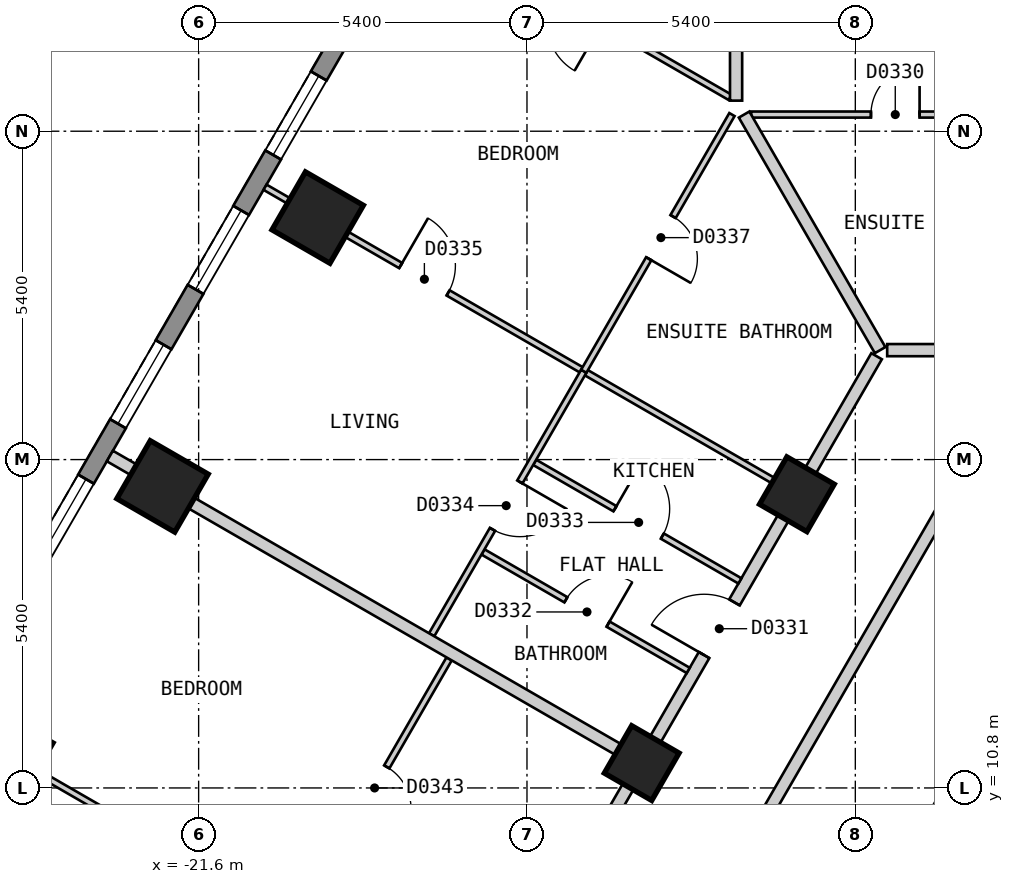
"""IFC4 building model, lengths in metres.
Left out: names, types, materials, properties, quantities, classifications, styles, units other than length and angle.
Written with IfcOpenShell. Run it as: python <this file> out.ifc"""

import sys

from ifc_helpers import new_model, si_unit, direction, frame, frame_2d, origin, origin_2d, place, context, subcontext, project, spatial, polyline, rectangle, outline, extrude, element, fill, save


model = new_model("IFC4")
c1 = context("Model", 3, precision=1e-05, world=origin(), true_north=direction((0.0, 1.0)))
c2 = subcontext(c1, "Body", "Model", "MODEL_VIEW")
j1 = project(units=[si_unit("LENGTHUNIT", "METRE"), si_unit("PLANEANGLEUNIT", "RADIAN")], contexts=[c1])
p1 = place(None, origin())
s1 = spatial("IfcSite", under=j1, at=p1, CompositionType="ELEMENT")
p2 = place(p1, origin())
s2 = spatial("IfcBuilding", under=s1, at=p2, CompositionType="ELEMENT")
p3 = place(p2, frame((0.0, 0.0, 59.4)))
s3 = spatial("IfcBuildingStorey", under=s2, at=p3, CompositionType="ELEMENT", Elevation=59.4)
for number, where, z_axis, x_axis in (
    (1, (-19.642, 20.18, 0.0), (0.0, 0.0, 1.0), (-0.5, -0.866, 0.0)),
    (2, (-22.194, 15.759, 0.0), (0.0, 0.0, 1.0), (-0.5, -0.866, 0.0)),
    (3, (-24.746, 11.339, 0.0), (0.0, 0.0, 1.0), (-0.5, -0.866, 0.0)),
):
    element("IfcColumn", number, at=place(p3, frame(where, z_axis=z_axis, x_axis=x_axis)), inside=s3, PredefinedType="COLUMN", context=c2, shape_type="SweptSolid", body=[
        extrude(rectangle(XDim=1.1, YDim=1.1, at=origin_2d()), origin(), (0.0, 0.0, 1.0), 3.0),
    ])
for number, where, z_axis, x_axis in (
    (4, (-11.761, 15.63, 0.0), (0.0, 0.0, 1.0), (-0.5, -0.866, 0.0)),
    (5, (-14.313, 11.209, 0.0), (0.0, 0.0, 1.0), (-0.5, -0.866, 0.0)),
):
    element("IfcColumn", number, at=place(p3, frame(where, z_axis=z_axis, x_axis=x_axis)), inside=s3, PredefinedType="COLUMN", context=c2, shape_type="SweptSolid", body=[
        extrude(rectangle(XDim=0.9, YDim=0.9, at=origin_2d()), origin(), (0.0, 0.0, 1.0), 3.0),
    ])
p4 = place(p3, frame((-17.71, 25.825, 0.0), z_axis=(0.0, 0.0, 1.0), x_axis=(-0.500001938803, -0.866024284413, 0.0)))
e6 = element("IfcWall", 6, at=p4, inside=s3, PredefinedType="SOLIDWALL", context=c2, shape_type="SweptSolid", body=[
    extrude(outline(polyline([(0.0, -0.15), (27.02, -0.15), (26.94, 0.15), (0.08, 0.15), (0.0, -0.15)])), origin(), (0.0, 0.0, 1.0), 2.6),
])
p5 = place(p4, frame((1.277, 0.0, 0.15)))
e7 = element("IfcOpeningElement", 7, at=p5, cuts=e6, PredefinedType="OPENING", context=c2, shape_type="SweptSolid", body=[
    extrude(rectangle(XDim=1.5, YDim=2.1, at=frame_2d((0.75, 1.05))), frame((0.0, 0.16, 0.0), z_axis=(0.0, -1.0, 0.0), x_axis=(1.0, 0.0, 0.0)), (0.0, 0.0, 1.0), 0.32),
])
p6 = place(p4, frame((3.829, 0.0, 0.15)))
e8 = element("IfcOpeningElement", 8, at=p6, cuts=e6, PredefinedType="OPENING", context=c2, shape_type="SweptSolid", body=[
    extrude(rectangle(XDim=1.5, YDim=2.1, at=frame_2d((0.75, 1.05))), frame((0.0, 0.16, 0.0), z_axis=(0.0, -1.0, 0.0), x_axis=(1.0, 0.0, 0.0)), (0.0, 0.0, 1.0), 0.32),
])
p7 = place(p4, frame((6.382, 0.0, 0.15)))
e9 = element("IfcOpeningElement", 9, at=p7, cuts=e6, PredefinedType="OPENING", context=c2, shape_type="SweptSolid", body=[
    extrude(rectangle(XDim=1.5, YDim=2.1, at=frame_2d((0.75, 1.05))), frame((0.0, 0.16, 0.0), z_axis=(0.0, -1.0, 0.0), x_axis=(1.0, 0.0, 0.0)), (0.0, 0.0, 1.0), 0.32),
])
p8 = place(p4, frame((8.933, 0.0, 0.15)))
e10 = element("IfcOpeningElement", 10, at=p8, cuts=e6, PredefinedType="OPENING", context=c2, shape_type="SweptSolid", body=[
    extrude(rectangle(XDim=1.5, YDim=2.1, at=frame_2d((0.75, 1.05))), frame((0.0, 0.16, 0.0), z_axis=(0.0, -1.0, 0.0), x_axis=(1.0, 0.0, 0.0)), (0.0, 0.0, 1.0), 0.32),
])
p9 = place(p4, frame((11.485, 0.0, 0.15)))
e11 = element("IfcOpeningElement", 11, at=p9, cuts=e6, PredefinedType="OPENING", context=c2, shape_type="SweptSolid", body=[
    extrude(rectangle(XDim=1.5, YDim=2.1, at=frame_2d((0.75, 1.05))), frame((0.0, 0.16, 0.0), z_axis=(0.0, -1.0, 0.0), x_axis=(1.0, 0.0, 0.0)), (0.0, 0.0, 1.0), 0.32),
])
p10 = place(p4, frame((14.037, 0.0, 0.15)))
e12 = element("IfcOpeningElement", 12, at=p10, cuts=e6, PredefinedType="OPENING", context=c2, shape_type="SweptSolid", body=[
    extrude(rectangle(XDim=1.5, YDim=2.1, at=frame_2d((0.75, 1.05))), frame((0.0, 0.16, 0.0), z_axis=(0.0, -1.0, 0.0), x_axis=(1.0, 0.0, 0.0)), (0.0, 0.0, 1.0), 0.32),
])
p11 = place(p4, frame((16.589, 0.0, 0.15)))
e13 = element("IfcOpeningElement", 13, at=p11, cuts=e6, PredefinedType="OPENING", context=c2, shape_type="SweptSolid", body=[
    extrude(rectangle(XDim=1.5, YDim=2.1, at=frame_2d((0.75, 1.05))), frame((0.0, 0.16, 0.0), z_axis=(0.0, -1.0, 0.0), x_axis=(1.0, 0.0, 0.0)), (0.0, 0.0, 1.0), 0.32),
])
p12 = place(p4, frame((19.141, 0.0, 0.15)))
e14 = element("IfcOpeningElement", 14, at=p12, cuts=e6, PredefinedType="OPENING", context=c2, shape_type="SweptSolid", body=[
    extrude(rectangle(XDim=1.5, YDim=2.1, at=frame_2d((0.75, 1.05))), frame((0.0, 0.16, 0.0), z_axis=(0.0, -1.0, 0.0), x_axis=(1.0, 0.0, 0.0)), (0.0, 0.0, 1.0), 0.32),
])
p13 = place(p4, frame((21.693, 0.0, 0.15)))
e15 = element("IfcOpeningElement", 15, at=p13, cuts=e6, PredefinedType="OPENING", context=c2, shape_type="SweptSolid", body=[
    extrude(rectangle(XDim=1.5, YDim=2.1, at=frame_2d((0.75, 1.05))), frame((0.0, 0.16, 0.0), z_axis=(0.0, -1.0, 0.0), x_axis=(1.0, 0.0, 0.0)), (0.0, 0.0, 1.0), 0.32),
])
p14 = place(p4, frame((24.244, 0.0, 0.15)))
e16 = element("IfcOpeningElement", 16, at=p14, cuts=e6, PredefinedType="OPENING", context=c2, shape_type="SweptSolid", body=[
    extrude(rectangle(XDim=1.5, YDim=2.1, at=frame_2d((0.75, 1.05))), frame((0.0, 0.16, 0.0), z_axis=(0.0, -1.0, 0.0), x_axis=(1.0, 0.0, 0.0)), (0.0, 0.0, 1.0), 0.32),
])
p15 = place(p3, frame((-10.276, 18.0, 0.0), z_axis=(0.0, 0.0, 1.0), x_axis=(1.0, 0.0, 0.0)))
e17 = element("IfcWall", 17, at=p15, inside=s3, PredefinedType="PARTITIONING", context=c2, shape_type="SweptSolid", body=[
    extrude(rectangle(XDim=20.5, YDim=0.2, at=frame_2d((10.25, 0.0))), origin(), (0.0, 0.0, 1.0), 2.6),
])
p16 = place(p15, frame((19.264, 0.0, 0.0)))
e18 = element("IfcOpeningElement", 18, at=p16, cuts=e17, PredefinedType="OPENING", context=c2, shape_type="SweptSolid", body=[
    extrude(rectangle(XDim=1.0, YDim=2.1, at=frame_2d((0.5, 1.05))), frame((0.0, 0.11, 0.0), z_axis=(0.0, -1.0, 0.0), x_axis=(1.0, 0.0, 0.0)), (0.0, 0.0, 1.0), 0.22),
])
p17 = place(p15, frame((14.879, 0.0, 0.0)))
e19 = element("IfcOpeningElement", 19, at=p17, cuts=e17, PredefinedType="OPENING", context=c2, shape_type="SweptSolid", body=[
    extrude(rectangle(XDim=1.0, YDim=2.1, at=frame_2d((0.5, 1.05))), frame((0.0, 0.11, 0.0), z_axis=(0.0, -1.0, 0.0), x_axis=(1.0, 0.0, 0.0)), (0.0, 0.0, 1.0), 0.22),
])
p18 = place(p15, frame((4.671, 0.0, 0.0)))
e20 = element("IfcOpeningElement", 20, at=p18, cuts=e17, PredefinedType="OPENING", context=c2, shape_type="SweptSolid", body=[
    extrude(rectangle(XDim=1.0, YDim=2.1, at=frame_2d((0.5, 1.05))), frame((0.0, 0.11, 0.0), z_axis=(0.0, -1.0, 0.0), x_axis=(1.0, 0.0, 0.0)), (0.0, 0.0, 1.0), 0.22),
])
p19 = place(p3, frame((-10.854, 8.0, 0.0), z_axis=(0.0, 0.0, 1.0), x_axis=(0.499964141897, 0.86604610548, 0.0)))
e21 = element("IfcWall", 21, at=p19, inside=s3, PredefinedType="PARTITIONING", context=c2, shape_type="SweptSolid", body=[
    extrude(rectangle(XDim=9.007, YDim=0.2, at=frame_2d((4.503, 0.0))), origin(), (0.0, 0.0, 1.0), 2.6),
])
p20 = place(p3, frame((-18.244, -0.001, 0.0), z_axis=(0.0, 0.0, 1.0), x_axis=(0.499962999376, 0.866046765051, 0.0)))
e22 = element("IfcWall", 22, at=p20, inside=s3, PredefinedType="PARTITIONING", context=c2, shape_type="SweptSolid", body=[
    extrude(rectangle(XDim=18.245, YDim=0.2, at=frame_2d((9.123, 0.0))), origin(), (0.0, 0.0, 1.0), 2.6),
])
p21 = place(p20, frame((8.672, 0.0, 0.0)))
e23 = element("IfcOpeningElement", 23, at=p21, cuts=e22, PredefinedType="OPENING", context=c2, shape_type="SweptSolid", body=[
    extrude(rectangle(XDim=0.9, YDim=2.1, at=frame_2d((0.45, 1.05))), frame((0.0, 0.11, 0.0), z_axis=(0.0, -1.0, 0.0), x_axis=(1.0, 0.0, 0.0)), (0.0, 0.0, 1.0), 0.22),
])
p22 = place(p3, frame((-20.727, 0.099, 0.0), z_axis=(0.0, 0.0, 1.0), x_axis=(0.499993204491, 0.866029327138, 0.0)))
e24 = element("IfcWall", 24, at=p22, inside=s3, PredefinedType="PARTITIONING", context=c2, shape_type="SweptSolid", body=[
    extrude(rectangle(XDim=20.554, YDim=0.2, at=frame_2d((10.277, 0.0))), origin(), (0.0, 0.0, 1.0), 2.6),
])
p23 = place(p22, frame((14.88, 0.0, 0.0)))
e25 = element("IfcOpeningElement", 25, at=p23, cuts=e24, PredefinedType="OPENING", context=c2, shape_type="SweptSolid", body=[
    extrude(rectangle(XDim=1.0, YDim=2.1, at=frame_2d((0.5, 1.05))), frame((0.0, 0.11, 0.0), z_axis=(0.0, -1.0, 0.0), x_axis=(1.0, 0.0, 0.0)), (0.0, 0.0, 1.0), 0.22),
])
p24 = place(p22, frame((4.673, 0.0, 0.0)))
e26 = element("IfcOpeningElement", 26, at=p24, cuts=e24, PredefinedType="OPENING", context=c2, shape_type="SweptSolid", body=[
    extrude(rectangle(XDim=1.0, YDim=2.1, at=frame_2d((0.5, 1.05))), frame((0.0, 0.11, 0.0), z_axis=(0.0, -1.0, 0.0), x_axis=(1.0, 0.0, 0.0)), (0.0, 0.0, 1.0), 0.22),
])
p25 = place(p22, frame((0.838, 0.0, 0.0)))
e27 = element("IfcOpeningElement", 27, at=p25, cuts=e24, PredefinedType="OPENING", context=c2, shape_type="SweptSolid", body=[
    extrude(rectangle(XDim=0.8, YDim=2.1, at=frame_2d((0.4, 1.05))), frame((0.0, 0.11, 0.0), z_axis=(0.0, -1.0, 0.0), x_axis=(1.0, 0.0, 0.0)), (0.0, 0.0, 1.0), 0.22),
])
p26 = place(p3, frame((-25.611, 11.839, 0.0), z_axis=(0.0, 0.0, 1.0), x_axis=(0.866022959057, -0.500004234368, 0.0)))
e28 = element("IfcWall", 28, at=p26, inside=s3, PredefinedType="PARTITIONING", context=c2, shape_type="SweptSolid", body=[
    extrude(rectangle(XDim=10.0, YDim=0.1, at=frame_2d((5.0, 0.0))), origin(), (0.0, 0.0, 1.0), 2.6),
])
p27 = place(p26, frame((4.305, 0.0, 0.0)))
e29 = element("IfcOpeningElement", 29, at=p27, cuts=e28, PredefinedType="OPENING", context=c2, shape_type="SweptSolid", body=[
    extrude(rectangle(XDim=0.9, YDim=2.1, at=frame_2d((0.45, 1.05))), frame((0.0, 0.06, 0.0), z_axis=(0.0, -1.0, 0.0), x_axis=(1.0, 0.0, 0.0)), (0.0, 0.0, 1.0), 0.12),
])
p28 = place(p3, frame((-16.923, 14.681, 0.0), z_axis=(0.0, 0.0, 1.0), x_axis=(0.866087525071, -0.499892387336, 0.0)))
e30 = element("IfcWall", 30, at=p28, inside=s3, PredefinedType="PARTITIONING", context=c2, shape_type="SweptSolid", body=[
    extrude(rectangle(XDim=3.897, YDim=0.1, at=frame_2d((1.948, 0.0))), origin(), (0.0, 0.0, 1.0), 2.6),
])
p29 = place(p28, frame((1.574, 0.0, 0.0)))
e31 = element("IfcOpeningElement", 31, at=p29, cuts=e30, PredefinedType="OPENING", context=c2, shape_type="SweptSolid", body=[
    extrude(rectangle(XDim=0.8, YDim=2.1, at=frame_2d((0.4, 1.05))), frame((0.0, 0.06, 0.0), z_axis=(0.0, -1.0, 0.0), x_axis=(1.0, 0.0, 0.0)), (0.0, 0.0, 1.0), 0.12),
])
p30 = place(p3, frame((-16.073, 16.154, 0.0), z_axis=(0.0, 0.0, 1.0), x_axis=(0.865979019114, -0.500080332001, 0.0)))
e32 = element("IfcWall", 32, at=p30, inside=s3, PredefinedType="PARTITIONING", context=c2, shape_type="SweptSolid", body=[
    extrude(rectangle(XDim=3.897, YDim=0.1, at=frame_2d((1.949, 0.0))), origin(), (0.0, 0.0, 1.0), 2.6),
])
p31 = place(p30, frame((1.524, 0.0, 0.0)))
e33 = element("IfcOpeningElement", 33, at=p31, cuts=e32, PredefinedType="OPENING", context=c2, shape_type="SweptSolid", body=[
    extrude(rectangle(XDim=0.9, YDim=2.1, at=frame_2d((0.45, 1.05))), frame((0.0, 0.06, 0.0), z_axis=(0.0, -1.0, 0.0), x_axis=(1.0, 0.0, 0.0)), (0.0, 0.0, 1.0), 0.12),
])
p32 = place(p3, frame((-20.508, 20.679, 0.0), z_axis=(0.0, 0.0, 1.0), x_axis=(0.866047370643, -0.499961950354, 0.0)))
e34 = element("IfcWall", 34, at=p32, inside=s3, PredefinedType="PARTITIONING", context=c2, shape_type="SweptSolid", body=[
    extrude(rectangle(XDim=10.001, YDim=0.1, at=frame_2d((5.0, 0.0))), origin(), (0.0, 0.0, 1.0), 2.6),
])
p33 = place(p32, frame((2.576, 0.0, 0.0)))
e35 = element("IfcOpeningElement", 35, at=p33, cuts=e34, PredefinedType="OPENING", context=c2, shape_type="SweptSolid", body=[
    extrude(rectangle(XDim=0.9, YDim=2.1, at=frame_2d((0.45, 1.05))), frame((0.0, 0.06, 0.0), z_axis=(0.0, -1.0, 0.0), x_axis=(1.0, 0.0, 0.0)), (0.0, 0.0, 1.0), 0.12),
])
p34 = place(p3, frame((-17.955, 25.099, 0.0), z_axis=(0.0, 0.0, 1.0), x_axis=(0.866036353684, -0.499981033738, 0.0)))
e36 = element("IfcWall", 36, at=p34, inside=s3, PredefinedType="PARTITIONING", context=c2, shape_type="SweptSolid", body=[
    extrude(rectangle(XDim=5.885, YDim=0.1, at=frame_2d((2.942, 0.0))), origin(), (0.0, 0.0, 1.0), 2.6),
])
p35 = place(p34, frame((2.55, 0.0, 0.0)))
e37 = element("IfcOpeningElement", 37, at=p35, cuts=e36, PredefinedType="OPENING", context=c2, shape_type="SweptSolid", body=[
    extrude(rectangle(XDim=0.9, YDim=2.1, at=frame_2d((0.45, 1.05))), frame((0.0, 0.06, 0.0), z_axis=(0.0, -1.0, 0.0), x_axis=(1.0, 0.0, 0.0)), (0.0, 0.0, 1.0), 0.12),
])
p36 = place(p3, frame((-12.513, 21.874, 0.0), z_axis=(0.0, 0.0, 1.0), x_axis=(1.0, 0.0, 0.0)))
e38 = element("IfcWall", 38, at=p36, inside=s3, PredefinedType="PARTITIONING", context=c2, shape_type="SweptSolid", body=[
    extrude(rectangle(XDim=4.806, YDim=0.1, at=frame_2d((2.403, 0.0))), origin(), (0.0, 0.0, 1.0), 2.6),
])
p37 = place(p36, frame((1.97, 0.0, 0.0)))
e39 = element("IfcOpeningElement", 39, at=p37, cuts=e38, PredefinedType="OPENING", context=c2, shape_type="SweptSolid", body=[
    extrude(rectangle(XDim=0.8, YDim=2.1, at=frame_2d((0.4, 1.05))), frame((0.0, 0.06, 0.0), z_axis=(0.0, -1.0, 0.0), x_axis=(1.0, 0.0, 0.0)), (0.0, 0.0, 1.0), 0.12),
])
p38 = place(p3, frame((-19.957, 8.633, 0.0), z_axis=(0.0, 0.0, 1.0), x_axis=(0.499967111503, 0.866044391134, 0.0)))
e40 = element("IfcWall", 40, at=p38, inside=s3, PredefinedType="PARTITIONING", context=c2, shape_type="SweptSolid", body=[
    extrude(rectangle(XDim=4.952, YDim=0.1, at=frame_2d((2.476, 0.0))), origin(), (0.0, 0.0, 1.0), 2.6),
])
p39 = place(p38, frame((2.102, 0.0, 0.0)))
e41 = element("IfcOpeningElement", 41, at=p39, cuts=e40, PredefinedType="OPENING", context=c2, shape_type="SweptSolid", body=[
    extrude(rectangle(XDim=0.8, YDim=2.1, at=frame_2d((0.4, 1.05))), frame((0.0, 0.06, 0.0), z_axis=(0.0, -1.0, 0.0), x_axis=(1.0, 0.0, 0.0)), (0.0, 0.0, 1.0), 0.12),
])
p40 = place(p3, frame((-17.768, 13.319, 0.0), z_axis=(0.0, 0.0, 1.0), x_axis=(0.499958946799, 0.866049104564, 0.0)))
e42 = element("IfcWall", 42, at=p40, inside=s3, PredefinedType="PARTITIONING", context=c2, shape_type="SweptSolid", body=[
    extrude(rectangle(XDim=5.004, YDim=0.1, at=frame_2d((2.502, 0.0))), origin(), (0.0, 0.0, 1.0), 2.6),
])
p41 = place(p40, frame((2.002, 0.0, 0.0)))
e43 = element("IfcOpeningElement", 43, at=p41, cuts=e42, PredefinedType="OPENING", context=c2, shape_type="SweptSolid", body=[
    extrude(rectangle(XDim=0.9, YDim=2.1, at=frame_2d((0.45, 1.05))), frame((0.0, 0.06, 0.0), z_axis=(0.0, -1.0, 0.0), x_axis=(1.0, 0.0, 0.0)), (0.0, 0.0, 1.0), 0.12),
])
p42 = place(p3, frame((-12.629, 21.874, 0.0), z_axis=(0.0, 0.0, 1.0), x_axis=(0.500024801635, -0.86601108408, 0.0)))
e44 = element("IfcWall", 44, at=p42, inside=s3, PredefinedType="PARTITIONING", context=c2, shape_type="SweptSolid", body=[
    extrude(rectangle(XDim=4.473, YDim=0.2, at=frame_2d((2.237, 0.0))), origin(), (0.0, 0.0, 1.0), 2.6),
])
p43 = place(p3, frame((-23.06, 16.259, 0.0), z_axis=(0.0, 0.0, 1.0), x_axis=(0.866047370643, -0.499961950354, 0.0)))
e45 = element("IfcWall", 45, at=p43, inside=s3, PredefinedType="PARTITIONING", context=c2, shape_type="SweptSolid", body=[
    extrude(rectangle(XDim=10.001, YDim=0.2, at=frame_2d((5.0, 0.0))), origin(), (0.0, 0.0, 1.0), 2.6),
])
p44 = place(p3, frame((-12.761, 22.103, 0.0), z_axis=(0.0, 0.0, 1.0), x_axis=(0.0, 1.0, 0.0)))
e46 = element("IfcWall", 46, at=p44, inside=s3, PredefinedType="PARTITIONING", context=c2, shape_type="SweptSolid", body=[
    extrude(rectangle(XDim=5.997, YDim=0.2, at=frame_2d((2.999, 0.0))), origin(), (0.0, 0.0, 1.0), 2.6),
])
p45 = place(p3, frame((-15.266, 17.653, 0.0), z_axis=(0.0, 0.0, 1.0), x_axis=(0.500007182864, 0.866021256716, 0.0)))
e47 = element("IfcWall", 47, at=p45, inside=s3, PredefinedType="PARTITIONING", context=c2, shape_type="SweptSolid", body=[
    extrude(rectangle(XDim=4.874, YDim=0.1, at=frame_2d((2.437, 0.0))), origin(), (0.0, 0.0, 1.0), 2.6),
])
p46 = place(p45, frame((2.137, 0.0, 0.0)))
e48 = element("IfcOpeningElement", 48, at=p46, cuts=e47, PredefinedType="OPENING", context=c2, shape_type="SweptSolid", body=[
    extrude(rectangle(XDim=0.8, YDim=2.1, at=frame_2d((0.4, 1.05))), frame((0.0, 0.06, 0.0), z_axis=(0.0, -1.0, 0.0), x_axis=(1.0, 0.0, 0.0)), (0.0, 0.0, 1.0), 0.12),
])
p47 = place(p6, origin())
e49 = element("IfcWindow", 49, at=p47, inside=s3, PartitioningType="SINGLE_PANEL", PredefinedType="WINDOW", context=c2, shape_type="SweptSolid", body=[
    extrude(rectangle(XDim=1.5, YDim=2.1, at=frame_2d((0.75, 1.05))), frame((0.0, 0.03, 0.0), z_axis=(0.0, -1.0, 0.0), x_axis=(1.0, 0.0, 0.0)), (0.0, 0.0, 1.0), 0.06),
])
fill(e8, e49)
p48 = place(p7, origin())
e50 = element("IfcWindow", 50, at=p48, inside=s3, PartitioningType="SINGLE_PANEL", PredefinedType="WINDOW", context=c2, shape_type="SweptSolid", body=[
    extrude(rectangle(XDim=1.5, YDim=2.1, at=frame_2d((0.75, 1.05))), frame((0.0, 0.03, 0.0), z_axis=(0.0, -1.0, 0.0), x_axis=(1.0, 0.0, 0.0)), (0.0, 0.0, 1.0), 0.06),
])
fill(e9, e50)
p49 = place(p8, origin())
e51 = element("IfcWindow", 51, at=p49, inside=s3, PartitioningType="SINGLE_PANEL", PredefinedType="WINDOW", context=c2, shape_type="SweptSolid", body=[
    extrude(rectangle(XDim=1.5, YDim=2.1, at=frame_2d((0.75, 1.05))), frame((0.0, 0.03, 0.0), z_axis=(0.0, -1.0, 0.0), x_axis=(1.0, 0.0, 0.0)), (0.0, 0.0, 1.0), 0.06),
])
fill(e10, e51)
p50 = place(p9, origin())
e52 = element("IfcWindow", 52, at=p50, inside=s3, PartitioningType="SINGLE_PANEL", PredefinedType="WINDOW", context=c2, shape_type="SweptSolid", body=[
    extrude(rectangle(XDim=1.5, YDim=2.1, at=frame_2d((0.75, 1.05))), frame((0.0, 0.03, 0.0), z_axis=(0.0, -1.0, 0.0), x_axis=(1.0, 0.0, 0.0)), (0.0, 0.0, 1.0), 0.06),
])
fill(e11, e52)
p51 = place(p37, origin())
e53 = element("IfcDoor", 53, at=p51, inside=s3, OperationType="SINGLE_SWING_RIGHT", PredefinedType="DOOR", context=c2, shape_type="SweptSolid", body=[
    extrude(rectangle(XDim=0.8, YDim=2.1, at=frame_2d((0.4, 1.05))), frame((0.0, 0.025, 0.0), z_axis=(0.0, -1.0, 0.0), x_axis=(1.0, 0.0, 0.0)), (0.0, 0.0, 1.0), 0.05),
])
fill(e39, e53)
p52 = place(p23, origin())
e54 = element("IfcDoor", 54, at=p52, inside=s3, OperationType="SINGLE_SWING_LEFT", PredefinedType="DOOR", context=c2, shape_type="SweptSolid", body=[
    extrude(rectangle(XDim=1.0, YDim=2.1, at=frame_2d((0.5, 1.05))), frame((0.0, 0.025, 0.0), z_axis=(0.0, -1.0, 0.0), x_axis=(1.0, 0.0, 0.0)), (0.0, 0.0, 1.0), 0.05),
])
fill(e25, e54)
p53 = place(p29, origin())
e55 = element("IfcDoor", 55, at=p53, inside=s3, OperationType="SINGLE_SWING_RIGHT", PredefinedType="DOOR", context=c2, shape_type="SweptSolid", body=[
    extrude(rectangle(XDim=0.8, YDim=2.1, at=frame_2d((0.4, 1.05))), frame((0.0, 0.025, 0.0), z_axis=(0.0, -1.0, 0.0), x_axis=(1.0, 0.0, 0.0)), (0.0, 0.0, 1.0), 0.05),
])
fill(e31, e55)
p54 = place(p31, origin())
e56 = element("IfcDoor", 56, at=p54, inside=s3, OperationType="SINGLE_SWING_LEFT", PredefinedType="DOOR", context=c2, shape_type="SweptSolid", body=[
    extrude(rectangle(XDim=0.9, YDim=2.1, at=frame_2d((0.45, 1.05))), frame((0.0, 0.025, 0.0), z_axis=(0.0, -1.0, 0.0), x_axis=(1.0, 0.0, 0.0)), (0.0, 0.0, 1.0), 0.05),
])
fill(e33, e56)
p55 = place(p41, origin())
e57 = element("IfcDoor", 57, at=p55, inside=s3, OperationType="SINGLE_SWING_RIGHT", PredefinedType="DOOR", context=c2, shape_type="SweptSolid", body=[
    extrude(rectangle(XDim=0.9, YDim=2.1, at=frame_2d((0.45, 1.05))), frame((0.0, 0.025, 0.0), z_axis=(0.0, -1.0, 0.0), x_axis=(1.0, 0.0, 0.0)), (0.0, 0.0, 1.0), 0.05),
])
fill(e43, e57)
p56 = place(p33, origin())
e58 = element("IfcDoor", 58, at=p56, inside=s3, OperationType="SINGLE_SWING_LEFT", PredefinedType="DOOR", context=c2, shape_type="SweptSolid", body=[
    extrude(rectangle(XDim=0.9, YDim=2.1, at=frame_2d((0.45, 1.05))), frame((0.0, 0.025, 0.0), z_axis=(0.0, -1.0, 0.0), x_axis=(1.0, 0.0, 0.0)), (0.0, 0.0, 1.0), 0.05),
])
fill(e35, e58)
p57 = place(p46, origin())
e59 = element("IfcDoor", 59, at=p57, inside=s3, OperationType="SINGLE_SWING_LEFT", PredefinedType="DOOR", context=c2, shape_type="SweptSolid", body=[
    extrude(rectangle(XDim=0.8, YDim=2.1, at=frame_2d((0.4, 1.05))), frame((0.0, 0.025, 0.0), z_axis=(0.0, -1.0, 0.0), x_axis=(1.0, 0.0, 0.0)), (0.0, 0.0, 1.0), 0.05),
])
fill(e48, e59)
p58 = place(p39, origin())
e60 = element("IfcDoor", 60, at=p58, inside=s3, OperationType="SINGLE_SWING_LEFT", PredefinedType="DOOR", context=c2, shape_type="SweptSolid", body=[
    extrude(rectangle(XDim=0.8, YDim=2.1, at=frame_2d((0.4, 1.05))), frame((0.0, 0.025, 0.0), z_axis=(0.0, -1.0, 0.0), x_axis=(1.0, 0.0, 0.0)), (0.0, 0.0, 1.0), 0.05),
])
fill(e41, e60)
save(model, sys.argv[1])
